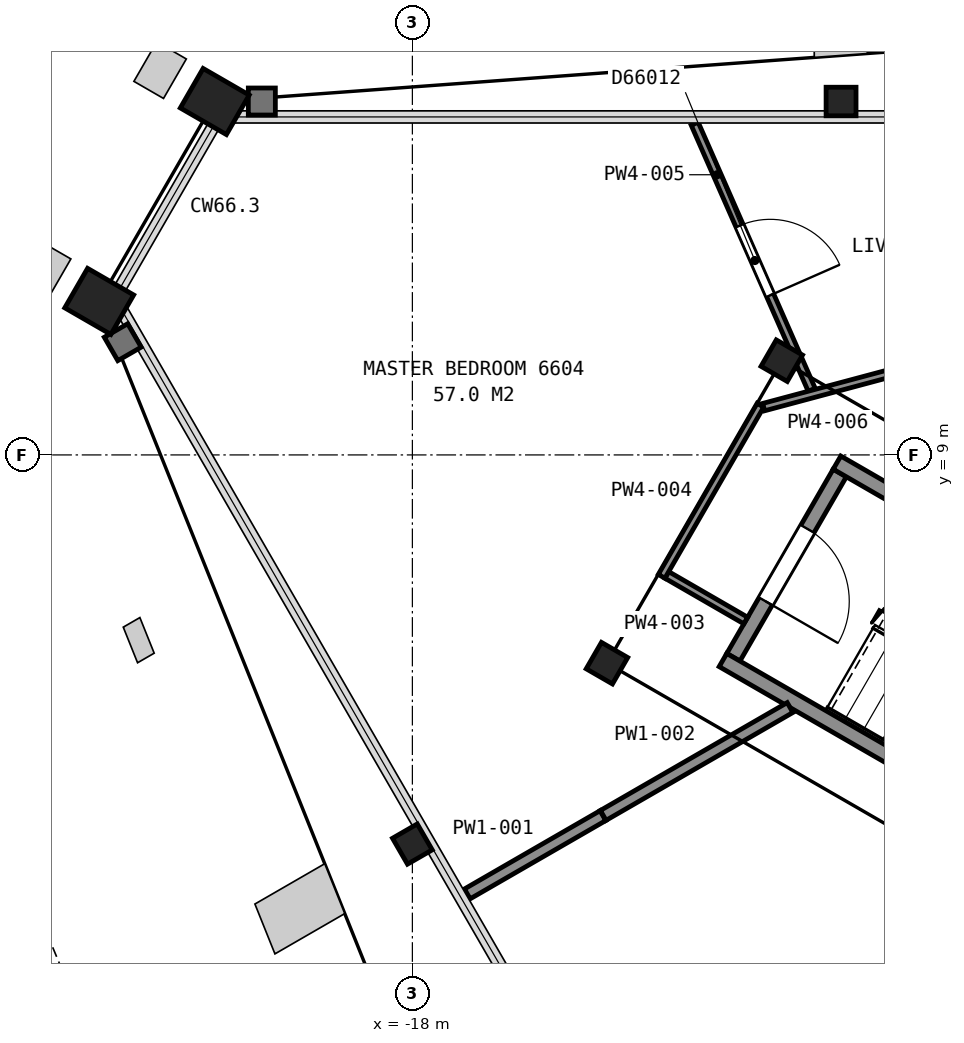
"""IFC4 building model, lengths in metres.
Left out: names, types, materials, properties, quantities, classifications, styles, units other than length and angle.
Written with IfcOpenShell. Run it as: python <this file> out.ifc"""

import sys

from ifc_helpers import new_model, si_unit, direction, frame, frame_2d, origin, origin_2d, place, context, subcontext, project, spatial, rectangle, hollow_rectangle, i_section, extrude, element, fill, save


model = new_model("IFC4")
c1 = context("Model", 3, precision=1e-05, world=origin(), true_north=direction((0.0, 1.0)))
c2 = subcontext(c1, "Body", "Model", "MODEL_VIEW")
j1 = project(units=[si_unit("LENGTHUNIT", "METRE"), si_unit("PLANEANGLEUNIT", "RADIAN")], contexts=[c1])
p1 = place(None, origin())
s1 = spatial("IfcSite", under=j1, at=p1, CompositionType="ELEMENT")
p2 = place(p1, origin())
s2 = spatial("IfcBuilding", under=s1, at=p2, CompositionType="ELEMENT")
p3 = place(p2, frame((0.0, 0.0, 264.0)))
s3 = spatial("IfcBuildingStorey", under=s2, at=p3, CompositionType="ELEMENT", Elevation=264.0)
p4 = place(p3, frame((-12.36, 13.65, 0.0), z_axis=(0.0, 0.0, 1.0), x_axis=(1.0, 0.0, 0.0)))
e1 = element("IfcColumn", 1, at=p4, inside=s3, PredefinedType="COLUMN", context=c2, shape_type="SweptSolid", body=[
    extrude(i_section(OverallWidth=0.394, OverallDepth=0.376, WebThickness=0.017, FlangeThickness=0.028, FilletRadius=0.015, at=origin_2d()), origin(), (0.0, 0.0, 1.0), 3.7),
])
for number, where, z_axis, x_axis in (
    (2, (-20.6, 13.65, 0.0), (0.0, 0.0, 1.0), (0.5, 0.866, 0.0)),
    (3, (-22.12, 11.02, 0.0), (0.0, 0.0, 1.0), (0.5, 0.866, 0.0)),
):
    element("IfcColumn", number, at=place(p3, frame(where, z_axis=z_axis, x_axis=x_axis)), inside=s3, PredefinedType="COLUMN", context=c2, shape_type="SweptSolid", body=[
        extrude(hollow_rectangle(XDim=0.6, YDim=0.7, WallThickness=0.04, at=origin_2d()), origin(), (0.0, 0.0, 1.0), 3.7),
    ])
p5 = place(p3, frame((-18.0, 3.88, 0.0), z_axis=(0.0, 0.0, 1.0), x_axis=(-0.5, 0.866025403784, 0.0)))
e4 = element("IfcColumn", 4, at=p5, inside=s3, PredefinedType="COLUMN", context=c2, shape_type="SweptSolid", body=[
    extrude(i_section(OverallWidth=0.394, OverallDepth=0.376, WebThickness=0.017, FlangeThickness=0.028, FilletRadius=0.015, at=origin_2d()), origin(), (0.0, 0.0, 1.0), 3.7),
])
for number, where, z_axis, x_axis in (
    (5, (-13.14, 10.24, 0.05), (0.0, 0.0, 1.0), (0.5, 0.866, 0.0)),
    (6, (-15.44, 6.26, 0.05), (0.0, 0.0, 1.0), (0.5, 0.866, 0.0)),
):
    element("IfcColumn", number, at=place(p3, frame(where, z_axis=z_axis, x_axis=x_axis)), inside=s3, PredefinedType="COLUMN", context=c2, shape_type="SweptSolid", body=[
        extrude(i_section(OverallWidth=0.401, OverallDepth=0.399, WebThickness=0.025, FlangeThickness=0.04, FilletRadius=0.015, at=origin_2d()), origin(), (0.0, 0.0, 1.0), 3.65),
    ])
p6 = place(p3, frame((-12.377, 8.762, 0.0), z_axis=(0.0, 0.0, 1.0), x_axis=(-0.500049511043, -0.865996816683, 0.0)))
e7 = element("IfcWall", 7, at=p6, inside=s3, PredefinedType="PARTITIONING", context=c2, shape_type="SweptSolid", body=[
    extrude(rectangle(XDim=2.8, YDim=0.2, at=frame_2d((1.4, 0.0))), origin(), (0.0, 0.0, 1.0), 3.45),
])
p7 = place(p6, frame((0.85, 0.0, 0.0)))
e8 = element("IfcOpeningElement", 8, at=p7, cuts=e7, PredefinedType="OPENING", context=c2, shape_type="SweptSolid", body=[
    extrude(rectangle(XDim=1.1, YDim=2.1, at=frame_2d((0.55, 1.05))), frame((0.0, 0.11, 0.0), z_axis=(0.0, -1.0, 0.0), x_axis=(1.0, 0.0, 0.0)), (0.0, 0.0, 1.0), 0.22),
])
for number, where, z_axis, x_axis in (
    (9, (-7.678, 2.701, 0.0), (0.0, 0.0, 1.0), (-0.866, 0.5, 0.0)),
    (10, (-6.178, 5.299, 0.0), (0.0, 0.0, 1.0), (-0.866, 0.5, 0.0)),
):
    element("IfcWall", number, at=place(p3, frame(where, z_axis=z_axis, x_axis=x_axis)), inside=s3, PredefinedType="PARTITIONING", context=c2, shape_type="SweptSolid", body=[
        extrude(rectangle(XDim=7.2, YDim=0.2, at=frame_2d((3.6, 0.0))), origin(), (0.0, 0.0, 1.0), 3.45),
    ])
p8 = place(p3, frame((-17.278, 3.224, 0.0), z_axis=(0.0, 0.0, 1.0), x_axis=(0.8661500768, 0.499783997803, 0.0)))
e11 = element("IfcWall", 11, at=p8, inside=s3, PredefinedType="PARTITIONING", context=c2, shape_type="SweptSolid", body=[
    extrude(rectangle(XDim=2.061, YDim=0.15, at=frame_2d((1.03, 0.0))), origin(), (0.0, 0.0, 1.0), 2.723),
])
p9 = place(p3, frame((-15.489, 4.257, 0.0), z_axis=(0.0, 0.0, 1.0), x_axis=(0.866053804324, 0.499950805595, 0.0)))
e12 = element("IfcWall", 12, at=p9, inside=s3, PredefinedType="PARTITIONING", context=c2, shape_type="SweptSolid", body=[
    extrude(rectangle(XDim=2.838, YDim=0.15, at=frame_2d((1.419, 0.0))), origin(), (0.0, 0.0, 1.0), 2.723),
])
p10 = place(p3, frame((-14.653, 7.421, 0.0), z_axis=(0.0, 0.0, 1.0), x_axis=(0.865941482684, -0.500145327446, 0.0)))
e13 = element("IfcWall", 13, at=p10, inside=s3, PredefinedType="PARTITIONING", context=c2, shape_type="SweptSolid", body=[
    extrude(rectangle(XDim=1.199, YDim=0.1, at=frame_2d((0.6, 0.0))), origin(), (0.0, 0.0, 1.0), 2.723),
])
p11 = place(p3, frame((-14.721, 7.403, 0.0), z_axis=(0.0, 0.0, 1.0), x_axis=(0.500006934395, 0.866021400173, 0.0)))
e14 = element("IfcWall", 14, at=p11, inside=s3, PredefinedType="PARTITIONING", context=c2, shape_type="SweptSolid", body=[
    extrude(rectangle(XDim=2.6, YDim=0.1, at=frame_2d((1.3, 0.0))), origin(), (0.0, 0.0, 1.0), 2.723),
])
p12 = place(p3, frame((-12.747, 9.857, 0.0), z_axis=(0.0, 0.0, 1.0), x_axis=(-0.402509649346, 0.91541574281, 0.0)))
e15 = element("IfcWall", 15, at=p12, inside=s3, PredefinedType="PARTITIONING", context=c2, shape_type="SweptSolid", body=[
    extrude(rectangle(XDim=3.824, YDim=0.1, at=frame_2d((1.912, 0.0))), origin(), (0.0, 0.0, 1.0), 2.723),
])
p13 = place(p12, frame((1.357, 0.0, 0.0)))
e16 = element("IfcOpeningElement", 16, at=p13, cuts=e15, PredefinedType="OPENING", context=c2, shape_type="SweptSolid", body=[
    extrude(rectangle(XDim=1.0, YDim=2.1, at=frame_2d((0.5, 1.05))), frame((0.0, 0.06, 0.0), z_axis=(0.0, -1.0, 0.0), x_axis=(1.0, 0.0, 0.0)), (0.0, 0.0, 1.0), 0.12),
])
p14 = place(p3, frame((-13.378, 9.629, 0.0), z_axis=(0.0, 0.0, 1.0), x_axis=(0.966007272337, 0.258514892785, 0.0)))
e17 = element("IfcWall", 17, at=p14, inside=s3, PredefinedType="PARTITIONING", context=c2, shape_type="SweptSolid", body=[
    extrude(rectangle(XDim=1.747, YDim=0.1, at=frame_2d((0.874, 0.0))), origin(), (0.0, 0.0, 1.0), 2.723),
])
p15 = place(p7, origin())
e18 = element("IfcDoor", 18, at=p15, inside=s3, OperationType="SINGLE_SWING_RIGHT", PredefinedType="DOOR", context=c2, shape_type="SweptSolid", body=[
    extrude(rectangle(XDim=1.1, YDim=2.1, at=frame_2d((0.55, 1.05))), frame((0.0, 0.025, 0.0), z_axis=(0.0, -1.0, 0.0), x_axis=(1.0, 0.0, 0.0)), (0.0, 0.0, 1.0), 0.05),
])
fill(e8, e18)
p16 = place(p13, origin())
e19 = element("IfcDoor", 19, at=p16, inside=s3, OperationType="SINGLE_SWING_LEFT", PredefinedType="DOOR", context=c2, shape_type="SweptSolid", body=[
    extrude(rectangle(XDim=1.0, YDim=2.1, at=frame_2d((0.5, 1.05))), frame((0.0, 0.025, 0.0), z_axis=(0.0, -1.0, 0.0), x_axis=(1.0, 0.0, 0.0)), (0.0, 0.0, 1.0), 0.05),
])
fill(e16, e19)
save(model, sys.argv[1])
